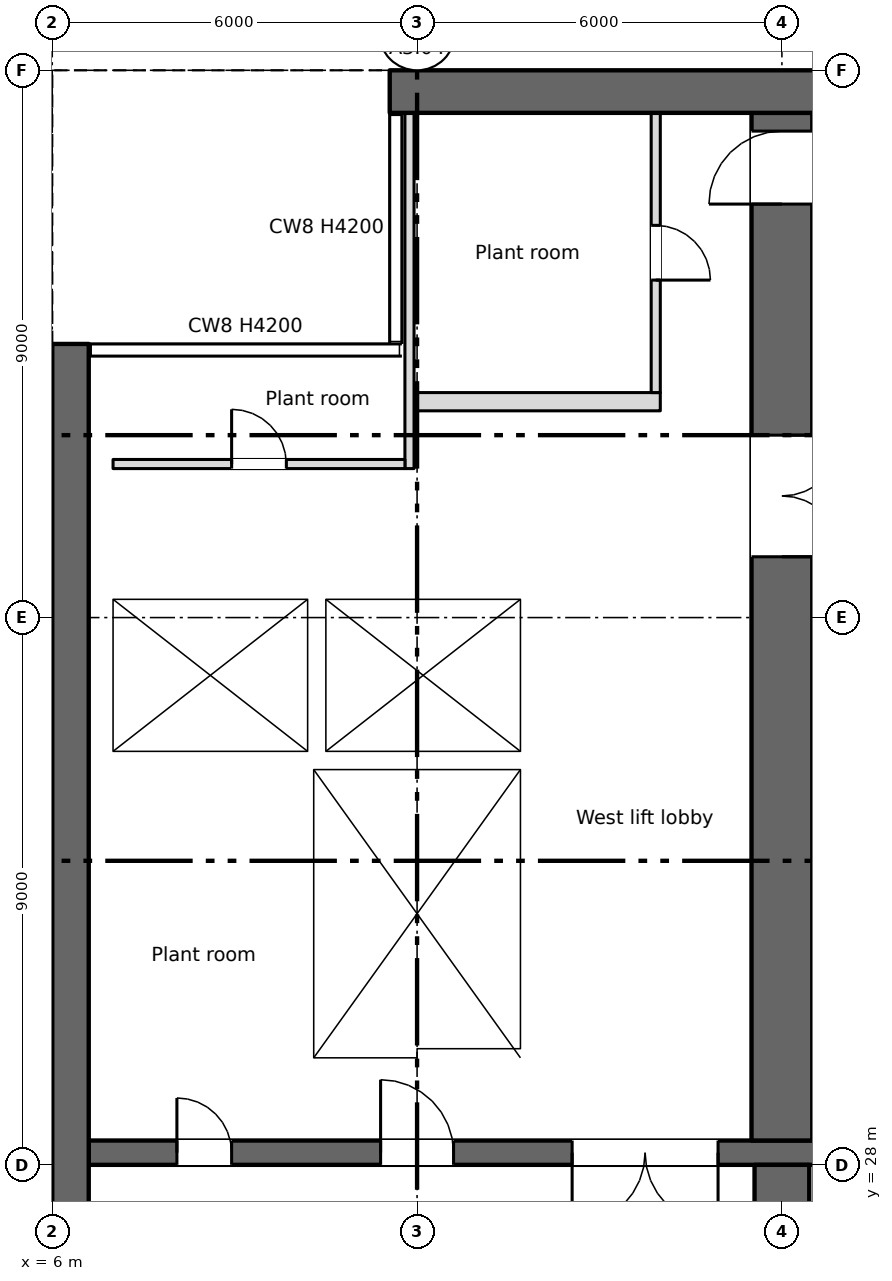
"""IFC4 building model, lengths in metres.
Left out: names, types, materials, properties, quantities, classifications, styles, units other than length and angle.
Written with IfcOpenShell. Run it as: python <this file> out.ifc"""

import sys

from ifc_helpers import new_model, si_unit, direction, frame, frame_2d, origin, place, context, subcontext, project, spatial, rectangle, extrude, element, fill, save


model = new_model("IFC4")
c1 = context("Model", 3, precision=1e-05, world=origin(), true_north=direction((0.0, 1.0)))
c2 = subcontext(c1, "Body", "Model", "MODEL_VIEW")
j1 = project(units=[si_unit("LENGTHUNIT", "METRE"), si_unit("PLANEANGLEUNIT", "RADIAN")], contexts=[c1])
p1 = place(None, origin())
s1 = spatial("IfcSite", under=j1, at=p1, CompositionType="ELEMENT")
p2 = place(p1, origin())
s2 = spatial("IfcBuilding", under=s1, at=p2, CompositionType="ELEMENT")
p3 = place(p2, frame((0.0, 0.0, 226.75)))
s3 = spatial("IfcBuildingStorey", under=s2, at=p3, CompositionType="ELEMENT", Elevation=226.75)
p4 = place(p3, frame((6.3, 7.5, 0.0), z_axis=(0.0, 0.0, 1.0), x_axis=(0.0, 1.0, 0.0)))
e1 = element("IfcWall", 1, at=p4, inside=s3, PredefinedType="SHEAR", context=c2, shape_type="SweptSolid", body=[
    extrude(rectangle(XDim=34.0, YDim=0.6, at=frame_2d((17.0, 0.0))), origin(), (0.0, 0.0, 1.0), 4.2),
])
p5 = place(p3, frame((11.55, 45.65, 0.0), z_axis=(0.0, 0.0, 1.0), x_axis=(1.0, 0.0, 0.0)))
e2 = element("IfcWall", 2, at=p5, inside=s3, PredefinedType="SHEAR", context=c2, shape_type="SweptSolid", body=[
    extrude(rectangle(XDim=54.9, YDim=0.7, at=frame_2d((27.45, 0.0))), origin(), (0.0, 0.0, 1.0), 4.2),
])
p6 = place(p3, frame((18.0, 4.4, 0.0), z_axis=(0.0, 0.0, 1.0), x_axis=(0.0, 1.0, 0.0)))
e3 = element("IfcWall", 3, at=p6, inside=s3, PredefinedType="SHEAR", context=c2, shape_type="SweptSolid", body=[
    extrude(rectangle(XDim=23.6, YDim=0.9, at=frame_2d((11.8, 0.0))), origin(), (0.0, 0.0, 1.0), 4.2),
])
p7 = place(p6, frame((21.5, 0.0, 0.0)))
e4 = element("IfcOpeningElement", 4, at=p7, cuts=e3, PredefinedType="OPENING", context=c2, shape_type="SweptSolid", body=[
    extrude(rectangle(XDim=1.2, YDim=2.1, at=frame_2d((0.6, 1.05))), frame((0.0, 0.46, 0.0), z_axis=(0.0, -1.0, 0.0), x_axis=(1.0, 0.0, 0.0)), (0.0, 0.0, 1.0), 0.92),
])
p8 = place(p3, frame((6.6, 28.2, 0.0), z_axis=(0.0, 0.0, 1.0), x_axis=(1.0, 0.0, 0.0)))
e5 = element("IfcWall", 5, at=p8, inside=s3, PredefinedType="SHEAR", context=c2, shape_type="SweptSolid", body=[
    extrude(rectangle(XDim=57.9, YDim=0.4, at=frame_2d((28.95, 0.0))), origin(), (0.0, 0.0, 1.0), 4.2),
])
p9 = place(p8, frame((13.95, 0.0, 0.0)))
e6 = element("IfcOpeningElement", 6, at=p9, cuts=e5, PredefinedType="OPENING", context=c2, shape_type="SweptSolid", body=[
    extrude(rectangle(XDim=0.9, YDim=2.1, at=frame_2d((0.45, 1.05))), frame((0.0, 0.21, 0.0), z_axis=(0.0, -1.0, 0.0), x_axis=(1.0, 0.0, 0.0)), (0.0, 0.0, 1.0), 0.42),
])
p10 = place(p8, frame((49.95, 0.0, 0.0)))
e7 = element("IfcOpeningElement", 7, at=p10, cuts=e5, PredefinedType="OPENING", context=c2, shape_type="SweptSolid", body=[
    extrude(rectangle(XDim=0.9, YDim=2.1, at=frame_2d((0.45, 1.05))), frame((0.0, 0.21, 0.0), z_axis=(0.0, -1.0, 0.0), x_axis=(1.0, 0.0, 0.0)), (0.0, 0.0, 1.0), 0.42),
])
p11 = place(p8, frame((1.45, 0.0, 0.0)))
e8 = element("IfcOpeningElement", 8, at=p11, cuts=e5, PredefinedType="OPENING", context=c2, shape_type="SweptSolid", body=[
    extrude(rectangle(XDim=0.9, YDim=2.1, at=frame_2d((0.45, 1.05))), frame((0.0, 0.21, 0.0), z_axis=(0.0, -1.0, 0.0), x_axis=(1.0, 0.0, 0.0)), (0.0, 0.0, 1.0), 0.42),
])
p12 = place(p8, frame((4.8, 0.0, 0.0)))
e9 = element("IfcOpeningElement", 9, at=p12, cuts=e5, PredefinedType="OPENING", context=c2, shape_type="SweptSolid", body=[
    extrude(rectangle(XDim=1.2, YDim=2.1, at=frame_2d((0.6, 1.05))), frame((0.0, 0.21, 0.0), z_axis=(0.0, -1.0, 0.0), x_axis=(1.0, 0.0, 0.0)), (0.0, 0.0, 1.0), 0.42),
])
p13 = place(p8, frame((31.8, 0.0, 0.0)))
e10 = element("IfcOpeningElement", 10, at=p13, cuts=e5, PredefinedType="OPENING", context=c2, shape_type="SweptSolid", body=[
    extrude(rectangle(XDim=1.2, YDim=2.1, at=frame_2d((0.6, 1.05))), frame((0.0, 0.21, 0.0), z_axis=(0.0, -1.0, 0.0), x_axis=(1.0, 0.0, 0.0)), (0.0, 0.0, 1.0), 0.42),
])
p14 = place(p8, frame((55.3, 0.0, 0.0)))
e11 = element("IfcOpeningElement", 11, at=p14, cuts=e5, PredefinedType="OPENING", context=c2, shape_type="SweptSolid", body=[
    extrude(rectangle(XDim=1.2, YDim=2.1, at=frame_2d((0.6, 1.05))), frame((0.0, 0.21, 0.0), z_axis=(0.0, -1.0, 0.0), x_axis=(1.0, 0.0, 0.0)), (0.0, 0.0, 1.0), 0.42),
])
p15 = place(p8, frame((21.8, 0.0, 0.0)))
e12 = element("IfcOpeningElement", 12, at=p15, cuts=e5, PredefinedType="OPENING", context=c2, shape_type="SweptSolid", body=[
    extrude(rectangle(XDim=1.2, YDim=2.1, at=frame_2d((0.6, 1.05))), frame((0.0, 0.21, 0.0), z_axis=(0.0, -1.0, 0.0), x_axis=(1.0, 0.0, 0.0)), (0.0, 0.0, 1.0), 0.42),
])
p16 = place(p8, frame((41.8, 0.0, 0.0)))
e13 = element("IfcOpeningElement", 13, at=p16, cuts=e5, PredefinedType="OPENING", context=c2, shape_type="SweptSolid", body=[
    extrude(rectangle(XDim=1.2, YDim=2.1, at=frame_2d((0.6, 1.05))), frame((0.0, 0.21, 0.0), z_axis=(0.0, -1.0, 0.0), x_axis=(1.0, 0.0, 0.0)), (0.0, 0.0, 1.0), 0.42),
])
p17 = place(p8, frame((24.95, 0.0, 0.0)))
e14 = element("IfcOpeningElement", 14, at=p17, cuts=e5, PredefinedType="OPENING", context=c2, shape_type="SweptSolid", body=[
    extrude(rectangle(XDim=2.4, YDim=2.1, at=frame_2d((1.2, 1.05))), frame((0.0, 0.21, 0.0), z_axis=(0.0, -1.0, 0.0), x_axis=(1.0, 0.0, 0.0)), (0.0, 0.0, 1.0), 0.42),
])
p18 = place(p8, frame((37.45, 0.0, 0.0)))
e15 = element("IfcOpeningElement", 15, at=p18, cuts=e5, PredefinedType="OPENING", context=c2, shape_type="SweptSolid", body=[
    extrude(rectangle(XDim=2.4, YDim=2.1, at=frame_2d((1.2, 1.05))), frame((0.0, 0.21, 0.0), z_axis=(0.0, -1.0, 0.0), x_axis=(1.0, 0.0, 0.0)), (0.0, 0.0, 1.0), 0.42),
])
p19 = place(p8, frame((7.95, 0.0, 0.0)))
e16 = element("IfcOpeningElement", 16, at=p19, cuts=e5, PredefinedType="OPENING", context=c2, shape_type="SweptSolid", body=[
    extrude(rectangle(XDim=2.4, YDim=2.1, at=frame_2d((1.2, 1.05))), frame((0.0, 0.21, 0.0), z_axis=(0.0, -1.0, 0.0), x_axis=(1.0, 0.0, 0.0)), (0.0, 0.0, 1.0), 0.42),
])
p20 = place(p8, frame((28.95, 0.0, 0.0)))
e17 = element("IfcOpeningElement", 17, at=p20, cuts=e5, PredefinedType="OPENING", context=c2, shape_type="SweptSolid", body=[
    extrude(rectangle(XDim=0.9, YDim=2.1, at=frame_2d((0.45, 1.05))), frame((0.0, 0.21, 0.0), z_axis=(0.0, -1.0, 0.0), x_axis=(1.0, 0.0, 0.0)), (0.0, 0.0, 1.0), 0.42),
])
p21 = place(p8, frame((34.95, 0.0, 0.0)))
e18 = element("IfcOpeningElement", 18, at=p21, cuts=e5, PredefinedType="OPENING", context=c2, shape_type="SweptSolid", body=[
    extrude(rectangle(XDim=0.9, YDim=2.1, at=frame_2d((0.45, 1.05))), frame((0.0, 0.21, 0.0), z_axis=(0.0, -1.0, 0.0), x_axis=(1.0, 0.0, 0.0)), (0.0, 0.0, 1.0), 0.42),
])
p22 = place(p3, frame((6.8, 28.4, 0.0), z_axis=(0.0, 0.0, 1.0), x_axis=(0.0, 1.0, 0.0)))
e19 = element("IfcWall", 19, at=p22, inside=s3, PredefinedType="SHEAR", context=c2, shape_type="SweptSolid", body=[
    extrude(rectangle(XDim=12.85, YDim=0.4, at=frame_2d((6.425, 0.0))), origin(), (0.0, 0.0, 1.0), 4.2),
])
p23 = place(p3, frame((18.0, 28.4, 0.0), z_axis=(0.0, 0.0, 1.0), x_axis=(0.0, 1.0, 0.0)))
e20 = element("IfcWall", 20, at=p23, inside=s3, PredefinedType="SHEAR", context=c2, shape_type="SweptSolid", body=[
    extrude(rectangle(XDim=16.9, YDim=1.0, at=frame_2d((8.45, 0.0))), origin(), (0.0, 0.0, 1.0), 4.2),
])
p24 = place(p23, frame((9.6, 0.0, 0.0)))
e21 = element("IfcOpeningElement", 21, at=p24, cuts=e20, PredefinedType="OPENING", context=c2, shape_type="SweptSolid", body=[
    extrude(rectangle(XDim=2.0, YDim=2.1, at=frame_2d((1.0, 1.05))), frame((0.0, 0.51, 0.0), z_axis=(0.0, -1.0, 0.0), x_axis=(1.0, 0.0, 0.0)), (0.0, 0.0, 1.0), 1.02),
])
p25 = place(p23, frame((15.4, 0.0, 0.0)))
e22 = element("IfcOpeningElement", 22, at=p25, cuts=e20, PredefinedType="OPENING", context=c2, shape_type="SweptSolid", body=[
    extrude(rectangle(XDim=1.2, YDim=2.1, at=frame_2d((0.6, 1.05))), frame((0.0, 0.51, 0.0), z_axis=(0.0, -1.0, 0.0), x_axis=(1.0, 0.0, 0.0)), (0.0, 0.0, 1.0), 1.02),
])
for number, where, z_axis, x_axis in (
    (23, (10.15, 28.4, 0.0), (0.0, 0.0, 1.0), (0.0, 1.0, 0.0)),
    (24, (13.85, 28.4, 0.0), (0.0, 0.0, 1.0), (0.0, 1.0, 0.0)),
):
    element("IfcWall", number, at=place(p3, frame(where, z_axis=z_axis, x_axis=x_axis)), inside=s3, PredefinedType="SHEAR", context=c2, shape_type="SweptSolid", body=[
        extrude(rectangle(XDim=6.1, YDim=0.3, at=frame_2d((3.05, 0.0))), origin(), (0.0, 0.0, 1.0), 4.2),
    ])
for number, where, z_axis, x_axis in (
    (25, (7.0, 34.65, 0.0), (0.0, 0.0, 1.0), (1.0, 0.0, 0.0)),
    (26, (7.0, 37.45, 0.0), (0.0, 0.0, 1.0), (1.0, 0.0, 0.0)),
):
    element("IfcWall", number, at=place(p3, frame(where, z_axis=z_axis, x_axis=x_axis)), inside=s3, PredefinedType="SHEAR", context=c2, shape_type="SweptSolid", body=[
        extrude(rectangle(XDim=7.0, YDim=0.3, at=frame_2d((3.5, 0.0))), origin(), (0.0, 0.0, 1.0), 4.2),
    ])
p26 = place(p3, frame((30.7, 37.45, 0.0), z_axis=(0.0, 0.0, 1.0), x_axis=(-1.0, 0.0, 0.0)))
e27 = element("IfcWall", 27, at=p26, inside=s3, PredefinedType="SHEAR", context=c2, shape_type="SweptSolid", body=[
    extrude(rectangle(XDim=12.2, YDim=0.3, at=frame_2d((6.1, 0.0))), origin(), (0.0, 0.0, 1.0), 4.2),
])
p27 = place(p26, frame((7.4, 0.0, 0.0)))
e28 = element("IfcOpeningElement", 28, at=p27, cuts=e27, PredefinedType="OPENING", context=c2, shape_type="SweptSolid", body=[
    extrude(rectangle(XDim=0.9, YDim=2.1, at=frame_2d((0.45, 1.05))), frame((0.0, 0.16, 0.0), z_axis=(0.0, -1.0, 0.0), x_axis=(1.0, 0.0, 0.0)), (0.0, 0.0, 1.0), 0.32),
])
p28 = place(p3, frame((13.85, 34.8, 0.0), z_axis=(0.0, 0.0, 1.0), x_axis=(0.0, 1.0, 0.0)))
e29 = element("IfcWall", 29, at=p28, inside=s3, PredefinedType="SHEAR", context=c2, shape_type="SweptSolid", body=[
    extrude(rectangle(XDim=2.5, YDim=0.3, at=frame_2d((1.25, 0.0))), origin(), (0.0, 0.0, 1.0), 4.2),
])
p29 = place(p3, frame((11.95, 40.55, 0.0), z_axis=(0.0, 0.0, 1.0), x_axis=(1.0, 0.0, 0.0)))
e30 = element("IfcWall", 30, at=p29, inside=s3, PredefinedType="PARTITIONING", context=c2, shape_type="SweptSolid", body=[
    extrude(rectangle(XDim=4.05, YDim=0.3, at=frame_2d((2.025, 0.0))), origin(), (0.0, 0.0, 1.0), 4.2),
])
p30 = place(p3, frame((10.35, 34.8, 0.0), z_axis=(0.0, 0.0, 1.0), x_axis=(0.0, 1.0, 0.0)))
e31 = element("IfcWall", 31, at=p30, inside=s3, PredefinedType="SHEAR", context=c2, shape_type="SweptSolid", body=[
    extrude(rectangle(XDim=2.5, YDim=0.3, at=frame_2d((1.25, 0.0))), origin(), (0.0, 0.0, 1.0), 4.2),
])
p31 = place(p3, frame((15.925, 45.3, 0.0), z_axis=(0.0, 0.0, 1.0), x_axis=(0.0, -1.0, 0.0)))
e32 = element("IfcWall", 32, at=p31, inside=s3, PredefinedType="PARTITIONING", context=c2, shape_type="SweptSolid", body=[
    extrude(rectangle(XDim=4.6, YDim=0.15, at=frame_2d((2.3, 0.0))), origin(), (0.0, 0.0, 1.0), 4.2),
])
p32 = place(p31, frame((1.85, 0.0, 0.0)))
e33 = element("IfcOpeningElement", 33, at=p32, cuts=e32, PredefinedType="OPENING", context=c2, shape_type="SweptSolid", body=[
    extrude(rectangle(XDim=0.9, YDim=2.1, at=frame_2d((0.45, 1.05))), frame((0.0, 0.085, 0.0), z_axis=(0.0, -1.0, 0.0), x_axis=(1.0, 0.0, 0.0)), (0.0, 0.0, 1.0), 0.17),
])
p33 = place(p3, frame((11.875, 39.45, 0.0), z_axis=(0.0, 0.0, 1.0), x_axis=(0.0, 1.0, 0.0)))
e34 = element("IfcWall", 34, at=p33, inside=s3, PredefinedType="PARTITIONING", context=c2, shape_type="SweptSolid", body=[
    extrude(rectangle(XDim=5.85, YDim=0.15, at=frame_2d((2.925, 0.0))), origin(), (0.0, 0.0, 1.0), 4.2),
])
p34 = place(p3, frame((7.0, 39.525, 0.0), z_axis=(0.0, 0.0, 1.0), x_axis=(1.0, 0.0, 0.0)))
e35 = element("IfcWall", 35, at=p34, inside=s3, PredefinedType="PARTITIONING", context=c2, shape_type="SweptSolid", body=[
    extrude(rectangle(XDim=4.8, YDim=0.15, at=frame_2d((2.4, 0.0))), origin(), (0.0, 0.0, 1.0), 4.2),
])
p35 = place(p34, frame((1.95, 0.0, 0.0)))
e36 = element("IfcOpeningElement", 36, at=p35, cuts=e35, PredefinedType="OPENING", context=c2, shape_type="SweptSolid", body=[
    extrude(rectangle(XDim=0.9, YDim=2.1, at=frame_2d((0.45, 1.05))), frame((0.0, 0.085, 0.0), z_axis=(0.0, -1.0, 0.0), x_axis=(1.0, 0.0, 0.0)), (0.0, 0.0, 1.0), 0.17),
])
p36 = place(p11, origin())
e37 = element("IfcDoor", 37, at=p36, inside=s3, OperationType="SINGLE_SWING_LEFT", PredefinedType="DOOR", context=c2, shape_type="SweptSolid", body=[
    extrude(rectangle(XDim=0.9, YDim=2.1, at=frame_2d((0.45, 1.05))), frame((0.0, 0.025, 0.0), z_axis=(0.0, -1.0, 0.0), x_axis=(1.0, 0.0, 0.0)), (0.0, 0.0, 1.0), 0.05),
])
fill(e8, e37)
p37 = place(p35, origin())
e38 = element("IfcDoor", 38, at=p37, inside=s3, OperationType="SINGLE_SWING_LEFT", PredefinedType="DOOR", context=c2, shape_type="SweptSolid", body=[
    extrude(rectangle(XDim=0.9, YDim=2.1, at=frame_2d((0.45, 1.05))), frame((0.0, 0.025, 0.0), z_axis=(0.0, -1.0, 0.0), x_axis=(1.0, 0.0, 0.0)), (0.0, 0.0, 1.0), 0.05),
])
fill(e36, e38)
p38 = place(p32, origin())
e39 = element("IfcDoor", 39, at=p38, inside=s3, OperationType="SINGLE_SWING_RIGHT", PredefinedType="DOOR", context=c2, shape_type="SweptSolid", body=[
    extrude(rectangle(XDim=0.9, YDim=2.1, at=frame_2d((0.45, 1.05))), frame((0.0, 0.025, 0.0), z_axis=(0.0, -1.0, 0.0), x_axis=(1.0, 0.0, 0.0)), (0.0, 0.0, 1.0), 0.05),
])
fill(e33, e39)
p39 = place(p12, origin())
e40 = element("IfcDoor", 40, at=p39, inside=s3, OperationType="SINGLE_SWING_LEFT", PredefinedType="DOOR", context=c2, shape_type="SweptSolid", body=[
    extrude(rectangle(XDim=1.2, YDim=2.1, at=frame_2d((0.6, 1.05))), frame((0.0, 0.025, 0.0), z_axis=(0.0, -1.0, 0.0), x_axis=(1.0, 0.0, 0.0)), (0.0, 0.0, 1.0), 0.05),
])
fill(e9, e40)
p40 = place(p19, origin())
e41 = element("IfcDoor", 41, at=p40, inside=s3, OperationType="DOUBLE_DOOR_SINGLE_SWING", PredefinedType="DOOR", context=c2, shape_type="SweptSolid", body=[
    extrude(rectangle(XDim=2.4, YDim=2.1, at=frame_2d((1.2, 1.05))), frame((0.0, 0.025, 0.0), z_axis=(0.0, -1.0, 0.0), x_axis=(1.0, 0.0, 0.0)), (0.0, 0.0, 1.0), 0.05),
])
fill(e16, e41)
p41 = place(p24, origin())
e42 = element("IfcDoor", 42, at=p41, inside=s3, OperationType="DOUBLE_DOOR_SINGLE_SWING", PredefinedType="DOOR", context=c2, shape_type="SweptSolid", body=[
    extrude(rectangle(XDim=2.0, YDim=2.1, at=frame_2d((1.0, 1.05))), frame((0.0, 0.025, 0.0), z_axis=(0.0, -1.0, 0.0), x_axis=(1.0, 0.0, 0.0)), (0.0, 0.0, 1.0), 0.05),
])
fill(e21, e42)
p42 = place(p25, origin())
e43 = element("IfcDoor", 43, at=p42, inside=s3, OperationType="SINGLE_SWING_LEFT", PredefinedType="DOOR", context=c2, shape_type="SweptSolid", body=[
    extrude(rectangle(XDim=1.2, YDim=2.1, at=frame_2d((0.6, 1.05))), frame((0.0, 0.025, 0.0), z_axis=(0.0, -1.0, 0.0), x_axis=(1.0, 0.0, 0.0)), (0.0, 0.0, 1.0), 0.05),
])
fill(e22, e43)
save(model, sys.argv[1])
